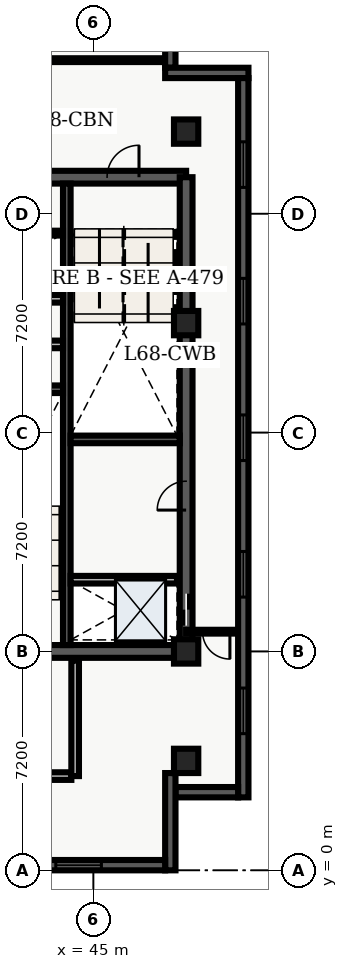
"""IFC4 building model, lengths in metres.
Left out: names, types, materials, properties, quantities, classifications, styles, units other than length and angle.
Written with IfcOpenShell. Run it as: python <this file> out.ifc"""

import sys

from ifc_helpers import new_model, entity, si_unit, converted_unit, direction, frame, origin_with_axes, origin_2d_with_axis, place, context, subcontext, project, spatial, polyline, rectangle, outline, extrude, element, fill, save


model = new_model("IFC4")
c1 = context("Model", 3, precision=1e-05, world=origin_with_axes(), true_north=direction((0.0, 1.0)))
c2 = subcontext(c1, "Body", "Model", "MODEL_VIEW")
j1 = project(units=[si_unit("LENGTHUNIT", "METRE"), converted_unit("PLANEANGLEUNIT", "DEGREE", entity("IfcPlaneAngleMeasure", 0.017), si_unit("PLANEANGLEUNIT", "RADIAN"), dimensions=[0, 0, 0, 0, 0, 0, 0])], contexts=[c1])
p1 = place(None, origin_with_axes())
s1 = spatial("IfcSite", under=j1, at=p1, CompositionType="ELEMENT")
p2 = place(p1, origin_with_axes())
s2 = spatial("IfcBuilding", under=s1, at=p2, CompositionType="ELEMENT")
p3 = place(p2, frame((0.0, 0.0, 276.3), z_axis=(0.0, 0.0, 1.0), x_axis=(1.0, 0.0, 0.0)))
s3 = spatial("IfcBuildingStorey", under=s2, at=p3, CompositionType="ELEMENT", Elevation=276.3)
p4 = place(p3, frame((40.2, 7.2, 0.0), z_axis=(0.0, 0.0, 1.0), x_axis=(1.0, 0.0, 0.0)))
e1 = element("IfcWall", 1, at=p4, inside=s3, PredefinedType="SHEAR", context=c2, shape_type="SweptSolid", body=[
    extrude(outline(polyline([(0.0, -0.21), (7.85, -0.21), (7.85, 0.21), (0.0, 0.21), (0.0, -0.21)])), origin_with_axes(), (0.0, 0.0, 1.0), 3.66),
])
p5 = place(p4, frame((2.175, 0.0, 0.0), z_axis=(0.0, 0.0, 1.0), x_axis=(1.0, 0.0, 0.0)))
e2 = element("IfcOpeningElement", 2, at=p5, cuts=e1, PredefinedType="OPENING", context=c2, shape_type="SweptSolid", body=[
    extrude(rectangle(XDim=1.05, YDim=0.44, at=origin_2d_with_axis()), origin_with_axes(), (0.0, 0.0, 1.0), 2.15),
])
p6 = place(p3, frame((40.2, 22.8, 0.0), z_axis=(0.0, 0.0, 1.0), x_axis=(1.0, 0.0, 0.0)))
e3 = element("IfcWall", 3, at=p6, inside=s3, PredefinedType="SHEAR", context=c2, shape_type="SweptSolid", body=[
    extrude(outline(polyline([(0.0, -0.21), (7.85, -0.21), (7.85, 0.21), (0.0, 0.21), (0.0, -0.21)])), origin_with_axes(), (0.0, 0.0, 1.0), 3.66),
])
p7 = place(p6, frame((5.775, 0.0, 0.0), z_axis=(0.0, 0.0, 1.0), x_axis=(1.0, 0.0, 0.0)))
e4 = element("IfcOpeningElement", 4, at=p7, cuts=e3, PredefinedType="OPENING", context=c2, shape_type="SweptSolid", body=[
    extrude(rectangle(XDim=1.05, YDim=0.44, at=origin_2d_with_axis()), origin_with_axes(), (0.0, 0.0, 1.0), 2.15),
])
p8 = place(p6, frame((2.15, 0.0, 0.0), z_axis=(0.0, 0.0, 1.0), x_axis=(1.0, 0.0, 0.0)))
e5 = element("IfcOpeningElement", 5, at=p8, cuts=e3, PredefinedType="OPENING", context=c2, shape_type="SweptSolid", body=[
    extrude(rectangle(XDim=0.9, YDim=0.44, at=origin_2d_with_axis()), origin_with_axes(), (0.0, 0.0, 1.0), 2.15),
])
p9 = place(p3, frame((48.05, 7.2, 0.0), z_axis=(0.0, 0.0, 1.0), x_axis=(0.0, 1.0, 0.0)))
e6 = element("IfcWall", 6, at=p9, inside=s3, PredefinedType="SHEAR", context=c2, shape_type="SweptSolid", body=[
    extrude(outline(polyline([(0.0, -0.21), (15.6, -0.21), (15.6, 0.21), (0.0, 0.21), (0.0, -0.21)])), origin_with_axes(), (0.0, 0.0, 1.0), 3.66),
])
p10 = place(p9, frame((1.375, 0.0, 0.0), z_axis=(0.0, 0.0, 1.0), x_axis=(1.0, 0.0, 0.0)))
e7 = element("IfcOpeningElement", 7, at=p10, cuts=e6, PredefinedType="OPENING", context=c2, shape_type="SweptSolid", body=[
    extrude(rectangle(XDim=1.05, YDim=0.44, at=origin_2d_with_axis()), origin_with_axes(), (0.0, 0.0, 1.0), 2.15),
])
p11 = place(p9, frame((5.125, 0.0, 0.0), z_axis=(0.0, 0.0, 1.0), x_axis=(1.0, 0.0, 0.0)))
e8 = element("IfcOpeningElement", 8, at=p11, cuts=e6, PredefinedType="OPENING", context=c2, shape_type="SweptSolid", body=[
    extrude(rectangle(XDim=0.95, YDim=0.44, at=origin_2d_with_axis()), origin_with_axes(), (0.0, 0.0, 1.0), 2.15),
])
p12 = place(p3, frame((44.125, 7.41, 0.0), z_axis=(0.0, 0.0, 1.0), x_axis=(0.0, 1.0, 0.0)))
e9 = element("IfcWall", 9, at=p12, inside=s3, PredefinedType="SHEAR", context=c2, shape_type="SweptSolid", body=[
    extrude(outline(polyline([(0.0, -0.125), (15.18, -0.125), (15.18, 0.125), (0.0, 0.125), (0.0, -0.125)])), origin_with_axes(), (0.0, 0.0, 1.0), 3.66),
])
for number, where, z_axis, x_axis in (
    (10, (40.41, 15.825, 0.0), (0.0, 0.0, 1.0), (1.0, 0.0, 0.0)),
    (11, (44.25, 14.175, 0.0), (0.0, 0.0, 1.0), (1.0, 0.0, 0.0)),
):
    element("IfcWall", number, at=place(p3, frame(where, z_axis=z_axis, x_axis=x_axis)), inside=s3, PredefinedType="SHEAR", context=c2, shape_type="SweptSolid", body=[
        extrude(outline(polyline([(0.0, -0.125), (3.59, -0.125), (3.59, 0.125), (0.0, 0.125), (0.0, -0.125)])), origin_with_axes(), (0.0, 0.0, 1.0), 3.66),
    ])
p13 = place(p3, frame((40.5, 17.3, 0.0), z_axis=(0.0, 0.0, 1.0), x_axis=(1.0, 0.0, 0.0)))
e12 = element("IfcWall", 12, at=p13, inside=s3, PredefinedType="SOLIDWALL", context=c2, shape_type="SweptSolid", body=[
    extrude(outline(polyline([(0.0, -0.125), (3.5, -0.125), (3.5, 0.125), (0.0, 0.125), (0.0, -0.125)])), origin_with_axes(), (0.0, 0.0, 1.0), 2.7),
])
p14 = place(p13, frame((2.4, 0.0, 0.0), z_axis=(0.0, 0.0, 1.0), x_axis=(1.0, 0.0, 0.0)))
e13 = element("IfcOpeningElement", 13, at=p14, cuts=e12, PredefinedType="OPENING", context=c2, shape_type="SweptSolid", body=[
    extrude(rectangle(XDim=0.9, YDim=0.27, at=origin_2d_with_axis()), origin_with_axes(), (0.0, 0.0, 1.0), 2.15),
])
p15 = place(p3, frame((40.5, 18.8, 0.0), z_axis=(0.0, 0.0, 1.0), x_axis=(1.0, 0.0, 0.0)))
e14 = element("IfcWall", 14, at=p15, inside=s3, PredefinedType="SOLIDWALL", context=c2, shape_type="SweptSolid", body=[
    extrude(outline(polyline([(0.0, -0.125), (3.5, -0.125), (3.5, 0.125), (0.0, 0.125), (0.0, -0.125)])), origin_with_axes(), (0.0, 0.0, 1.0), 2.7),
])
p16 = place(p3, frame((40.325, 3.1, 0.0), z_axis=(0.0, 0.0, 1.0), x_axis=(1.0, 0.0, 0.0)))
e15 = element("IfcWall", 15, at=p16, inside=s3, PredefinedType="SOLIDWALL", context=c2, shape_type="SweptSolid", body=[
    extrude(outline(polyline([(0.0, -0.125), (3.95, -0.125), (3.95, 0.125), (0.0, 0.125), (0.0, -0.125)])), origin_with_axes(), (0.0, 0.0, 1.0), 2.7),
])
p17 = place(p3, frame((44.4, 3.1, 0.0), z_axis=(0.0, 0.0, 1.0), x_axis=(0.0, 1.0, 0.0)))
e16 = element("IfcWall", 16, at=p17, inside=s3, PredefinedType="SOLIDWALL", context=c2, shape_type="SweptSolid", body=[
    extrude(outline(polyline([(0.0, -0.125), (3.8, -0.125), (3.8, 0.125), (0.0, 0.125), (0.0, -0.125)])), origin_with_axes(), (0.0, 0.0, 1.0), 2.7),
])
for number, where, z_axis, x_axis in (
    (17, (48.05, 3.6, 0.0), (0.0, 0.0, 1.0), (1.0, 0.0, 0.0)),
    (18, (48.05, 7.2, 0.0), (0.0, 0.0, 1.0), (1.0, 0.0, 0.0)),
    (19, (48.05, 18.0, 0.0), (0.0, 0.0, 1.0), (1.0, 0.0, 0.0)),
    (20, (48.05, 24.3, 0.0), (0.0, 0.0, 1.0), (1.0, 0.0, 0.0)),
):
    element("IfcColumn", number, at=place(p3, frame(where, z_axis=z_axis, x_axis=x_axis)), inside=s3, PredefinedType="COLUMN", context=c2, shape_type="SweptSolid", body=[
        extrude(rectangle(XDim=0.8, YDim=0.8, at=origin_2d_with_axis()), origin_with_axes(), (0.0, 0.0, 1.0), 3.9),
    ])
p18 = place(p3, frame((40.5, 20.96, 0.0), z_axis=(0.0, 0.0, 1.0), x_axis=(1.0, 0.0, 0.0)))
e21 = element("IfcWall", 21, at=p18, inside=s3, PredefinedType="PARTITIONING", context=c2, shape_type="SweptSolid", body=[
    extrude(outline(polyline([(0.0, -0.08), (3.5, -0.08), (3.5, 0.08), (0.0, 0.08), (0.0, -0.08)])), origin_with_axes(), (0.0, 0.0, 1.0), 2.7),
])
p19 = place(p3, frame((44.25, 9.56, 0.0), z_axis=(0.0, 0.0, 1.0), x_axis=(1.0, 0.0, 0.0)))
e22 = element("IfcWall", 22, at=p19, inside=s3, PredefinedType="SOLIDWALL", context=c2, shape_type="SweptSolid", body=[
    extrude(outline(polyline([(0.0, -0.125), (3.5, -0.125), (3.5, 0.125), (0.0, 0.125), (0.0, -0.125)])), origin_with_axes(), (0.0, 0.0, 1.0), 2.7),
])
p20 = place(p3, frame((49.765, 7.85, 0.0), z_axis=(0.0, 0.0, 1.0), x_axis=(-1.0, 0.0, 0.0)))
e23 = element("IfcWall", 23, at=p20, inside=s3, PredefinedType="PARTITIONING", context=c2, shape_type="SweptSolid", body=[
    extrude(outline(polyline([(0.0, -0.062), (1.715, -0.062), (1.715, 0.062), (0.0, 0.062), (0.0, -0.062)])), origin_with_axes(), (0.0, 0.0, 1.0), 2.7),
])
p21 = place(p20, frame((0.725, 0.0, 0.0), z_axis=(0.0, 0.0, 1.0), x_axis=(1.0, 0.0, 0.0)))
e24 = element("IfcOpeningElement", 24, at=p21, cuts=e23, PredefinedType="OPENING", context=c2, shape_type="SweptSolid", body=[
    extrude(rectangle(XDim=0.9, YDim=0.145, at=origin_2d_with_axis()), origin_with_axes(), (0.0, 0.0, 1.0), 2.15),
])
p22 = place(p3, frame((34.535, 26.65, 0.0), z_axis=(0.0, 0.0, 1.0), x_axis=(1.0, 0.0, 0.0)))
e25 = element("IfcWall", 25, at=p22, inside=s3, PredefinedType="PARTITIONING", context=c2, shape_type="SweptSolid", body=[
    extrude(outline(polyline([(0.0, -0.062), (12.995, -0.062), (12.995, 0.062), (0.0, 0.062), (0.0, -0.062)])), origin_with_axes(), (0.0, 0.0, 1.0), 2.7),
])
p23 = place(p22, frame((8.465, 0.0, 0.0), z_axis=(0.0, 0.0, 1.0), x_axis=(1.0, 0.0, 0.0)))
e26 = element("IfcOpeningElement", 26, at=p23, cuts=e25, PredefinedType="OPENING", context=c2, shape_type="SweptSolid", body=[
    extrude(rectangle(XDim=1.0, YDim=0.145, at=origin_2d_with_axis()), origin_with_axes(), (0.0, 0.0, 1.0), 2.15),
])
p24 = place(p3, frame((47.53, 28.46, 0.0), z_axis=(0.0, 0.0, 1.0), x_axis=(0.0, -1.0, 0.0)))
e27 = element("IfcWall", 27, at=p24, inside=s3, PredefinedType="SOLIDWALL", context=c2, shape_type="SweptSolid", body=[
    extrude(outline(polyline([(0.0, -0.17), (2.06, -0.17), (2.06, 0.17), (0.0, 0.17), (0.0, -0.17)])), origin_with_axes(), (0.0, 0.0, 1.0), 3.66),
])
p25 = place(p3, frame((47.36, 26.23, 0.0), z_axis=(0.0, 0.0, 1.0), x_axis=(1.0, 0.0, 0.0)))
e28 = element("IfcWall", 28, at=p25, inside=s3, PredefinedType="SOLIDWALL", context=c2, shape_type="SweptSolid", body=[
    extrude(outline(polyline([(0.0, -0.17), (2.74, -0.17), (2.74, 0.17), (0.0, 0.17), (0.0, -0.17)])), origin_with_axes(), (0.0, 0.0, 1.0), 3.66),
])
p26 = place(p3, frame((49.93, 26.06, 0.0), z_axis=(0.0, 0.0, 1.0), x_axis=(0.0, -1.0, 0.0)))
e29 = element("IfcWall", 29, at=p26, inside=s3, PredefinedType="SOLIDWALL", context=c2, shape_type="SweptSolid", body=[
    extrude(outline(polyline([(0.0, -0.17), (23.66, -0.17), (23.66, 0.17), (0.0, 0.17), (0.0, -0.17)])), origin_with_axes(), (0.0, 0.0, 1.0), 3.66),
])
p27 = place(p26, frame((2.846, 0.0, 0.45), z_axis=(0.0, 0.0, 1.0), x_axis=(1.0, 0.0, 0.0)))
e30 = element("IfcOpeningElement", 30, at=p27, cuts=e29, PredefinedType="OPENING", context=c2, shape_type="SweptSolid", body=[
    extrude(rectangle(XDim=1.5, YDim=0.36, at=origin_2d_with_axis()), origin_with_axes(), (0.0, 0.0, 1.0), 2.1),
])
p28 = place(p26, frame((7.338, 0.0, 0.45), z_axis=(0.0, 0.0, 1.0), x_axis=(1.0, 0.0, 0.0)))
e31 = element("IfcOpeningElement", 31, at=p28, cuts=e29, PredefinedType="OPENING", context=c2, shape_type="SweptSolid", body=[
    extrude(rectangle(XDim=1.5, YDim=0.36, at=origin_2d_with_axis()), origin_with_axes(), (0.0, 0.0, 1.0), 2.1),
])
p29 = place(p26, frame((11.83, 0.0, 0.45), z_axis=(0.0, 0.0, 1.0), x_axis=(1.0, 0.0, 0.0)))
e32 = element("IfcOpeningElement", 32, at=p29, cuts=e29, PredefinedType="OPENING", context=c2, shape_type="SweptSolid", body=[
    extrude(rectangle(XDim=1.5, YDim=0.36, at=origin_2d_with_axis()), origin_with_axes(), (0.0, 0.0, 1.0), 2.1),
])
p30 = place(p26, frame((16.322, 0.0, 0.45), z_axis=(0.0, 0.0, 1.0), x_axis=(1.0, 0.0, 0.0)))
e33 = element("IfcOpeningElement", 33, at=p30, cuts=e29, PredefinedType="OPENING", context=c2, shape_type="SweptSolid", body=[
    extrude(rectangle(XDim=1.5, YDim=0.36, at=origin_2d_with_axis()), origin_with_axes(), (0.0, 0.0, 1.0), 2.1),
])
p31 = place(p26, frame((20.814, 0.0, 0.45), z_axis=(0.0, 0.0, 1.0), x_axis=(1.0, 0.0, 0.0)))
e34 = element("IfcOpeningElement", 34, at=p31, cuts=e29, PredefinedType="OPENING", context=c2, shape_type="SweptSolid", body=[
    extrude(rectangle(XDim=1.5, YDim=0.36, at=origin_2d_with_axis()), origin_with_axes(), (0.0, 0.0, 1.0), 2.1),
])
p32 = place(p3, frame((49.76, 2.57, 0.0), z_axis=(0.0, 0.0, 1.0), x_axis=(-1.0, 0.0, 0.0)))
e35 = element("IfcWall", 35, at=p32, inside=s3, PredefinedType="SOLIDWALL", context=c2, shape_type="SweptSolid", body=[
    extrude(outline(polyline([(0.0, -0.17), (2.06, -0.17), (2.06, 0.17), (0.0, 0.17), (0.0, -0.17)])), origin_with_axes(), (0.0, 0.0, 1.0), 3.66),
])
p33 = place(p3, frame((47.53, 3.2, 0.0), z_axis=(0.0, 0.0, 1.0), x_axis=(0.0, -1.0, 0.0)))
e36 = element("IfcWall", 36, at=p33, inside=s3, PredefinedType="SOLIDWALL", context=c2, shape_type="SweptSolid", body=[
    extrude(outline(polyline([(0.0, -0.17), (3.2, -0.17), (3.2, 0.17), (0.0, 0.17), (0.0, -0.17)])), origin_with_axes(), (0.0, 0.0, 1.0), 3.66),
])
p34 = place(p3, frame((47.36, 0.17, 0.0), z_axis=(0.0, 0.0, 1.0), x_axis=(-1.0, 0.0, 0.0)))
e37 = element("IfcWall", 37, at=p34, inside=s3, PredefinedType="SOLIDWALL", context=c2, shape_type="SweptSolid", body=[
    extrude(outline(polyline([(0.0, -0.17), (37.16, -0.17), (37.16, 0.17), (0.0, 0.17), (0.0, -0.17)])), origin_with_axes(), (0.0, 0.0, 1.0), 3.66),
])
p35 = place(p34, frame((2.847, 0.0, 0.45), z_axis=(0.0, 0.0, 1.0), x_axis=(1.0, 0.0, 0.0)))
e38 = element("IfcOpeningElement", 38, at=p35, cuts=e37, PredefinedType="OPENING", context=c2, shape_type="SweptSolid", body=[
    extrude(rectangle(XDim=1.5, YDim=0.36, at=origin_2d_with_axis()), origin_with_axes(), (0.0, 0.0, 1.0), 2.1),
])
p36 = place(p34, frame((7.342, 0.0, 0.45), z_axis=(0.0, 0.0, 1.0), x_axis=(1.0, 0.0, 0.0)))
e39 = element("IfcOpeningElement", 39, at=p36, cuts=e37, PredefinedType="OPENING", context=c2, shape_type="SweptSolid", body=[
    extrude(rectangle(XDim=1.5, YDim=0.36, at=origin_2d_with_axis()), origin_with_axes(), (0.0, 0.0, 1.0), 2.1),
])
p37 = place(p34, frame((11.837, 0.0, 0.45), z_axis=(0.0, 0.0, 1.0), x_axis=(1.0, 0.0, 0.0)))
e40 = element("IfcOpeningElement", 40, at=p37, cuts=e37, PredefinedType="OPENING", context=c2, shape_type="SweptSolid", body=[
    extrude(rectangle(XDim=1.5, YDim=0.36, at=origin_2d_with_axis()), origin_with_axes(), (0.0, 0.0, 1.0), 2.1),
])
p38 = place(p34, frame((15.882, 0.0, 0.45), z_axis=(0.0, 0.0, 1.0), x_axis=(1.0, 0.0, 0.0)))
e41 = element("IfcOpeningElement", 41, at=p38, cuts=e37, PredefinedType="OPENING", context=c2, shape_type="SweptSolid", body=[
    extrude(rectangle(XDim=1.5, YDim=0.36, at=origin_2d_with_axis()), origin_with_axes(), (0.0, 0.0, 1.0), 2.1),
])
p39 = place(p34, frame((20.827, 0.0, 0.45), z_axis=(0.0, 0.0, 1.0), x_axis=(1.0, 0.0, 0.0)))
e42 = element("IfcOpeningElement", 42, at=p39, cuts=e37, PredefinedType="OPENING", context=c2, shape_type="SweptSolid", body=[
    extrude(rectangle(XDim=1.5, YDim=0.36, at=origin_2d_with_axis()), origin_with_axes(), (0.0, 0.0, 1.0), 2.1),
])
p40 = place(p34, frame((25.322, 0.0, 0.45), z_axis=(0.0, 0.0, 1.0), x_axis=(1.0, 0.0, 0.0)))
e43 = element("IfcOpeningElement", 43, at=p40, cuts=e37, PredefinedType="OPENING", context=c2, shape_type="SweptSolid", body=[
    extrude(rectangle(XDim=1.5, YDim=0.36, at=origin_2d_with_axis()), origin_with_axes(), (0.0, 0.0, 1.0), 2.1),
])
p41 = place(p34, frame((29.817, 0.0, 0.45), z_axis=(0.0, 0.0, 1.0), x_axis=(1.0, 0.0, 0.0)))
e44 = element("IfcOpeningElement", 44, at=p41, cuts=e37, PredefinedType="OPENING", context=c2, shape_type="SweptSolid", body=[
    extrude(rectangle(XDim=1.5, YDim=0.36, at=origin_2d_with_axis()), origin_with_axes(), (0.0, 0.0, 1.0), 2.1),
])
p42 = place(p34, frame((34.312, 0.0, 0.45), z_axis=(0.0, 0.0, 1.0), x_axis=(1.0, 0.0, 0.0)))
e45 = element("IfcOpeningElement", 45, at=p42, cuts=e37, PredefinedType="OPENING", context=c2, shape_type="SweptSolid", body=[
    extrude(rectangle(XDim=1.5, YDim=0.36, at=origin_2d_with_axis()), origin_with_axes(), (0.0, 0.0, 1.0), 2.1),
])
p43 = place(p9, frame((1.375, 0.0, 0.0), z_axis=(0.0, 0.0, 1.0), x_axis=(1.0, 0.0, 0.0)))
e46 = element("IfcDoor", 46, at=p43, inside=s3, OperationType="SLIDING_TO_LEFT", PredefinedType="DOOR", context=c2, shape_type="SweptSolid", body=[
    extrude(rectangle(XDim=1.05, YDim=0.09, at=origin_2d_with_axis()), origin_with_axes(), (0.0, 0.0, 1.0), 2.15),
])
fill(e7, e46)
p44 = place(p6, frame((5.775, 0.0, 0.0), z_axis=(0.0, 0.0, 1.0), x_axis=(1.0, 0.0, 0.0)))
e47 = element("IfcDoor", 47, at=p44, inside=s3, OperationType="SINGLE_SWING_RIGHT", PredefinedType="DOOR", context=c2, shape_type="SweptSolid", body=[
    extrude(rectangle(XDim=1.05, YDim=0.09, at=origin_2d_with_axis()), origin_with_axes(), (0.0, 0.0, 1.0), 2.15),
])
fill(e4, e47)
p45 = place(p9, frame((5.125, 0.0, 0.0), z_axis=(0.0, 0.0, 1.0), x_axis=(1.0, 0.0, 0.0)))
e48 = element("IfcDoor", 48, at=p45, inside=s3, OperationType="SINGLE_SWING_LEFT", PredefinedType="DOOR", context=c2, shape_type="SweptSolid", body=[
    extrude(rectangle(XDim=0.95, YDim=0.09, at=origin_2d_with_axis()), origin_with_axes(), (0.0, 0.0, 1.0), 2.15),
])
fill(e8, e48)
p46 = place(p20, frame((0.725, 0.0, 0.0), z_axis=(0.0, 0.0, 1.0), x_axis=(1.0, 0.0, 0.0)))
e49 = element("IfcDoor", 49, at=p46, inside=s3, OperationType="SINGLE_SWING_LEFT", PredefinedType="DOOR", context=c2, shape_type="SweptSolid", body=[
    extrude(rectangle(XDim=0.9, YDim=0.075, at=origin_2d_with_axis()), origin_with_axes(), (0.0, 0.0, 1.0), 2.15),
])
fill(e24, e49)
p47 = place(p26, frame((2.846, 0.0, 0.45), z_axis=(0.0, 0.0, 1.0), x_axis=(1.0, 0.0, 0.0)))
e50 = element("IfcWindow", 50, at=p47, inside=s3, PredefinedType="WINDOW", context=c2, shape_type="SweptSolid", body=[
    extrude(rectangle(XDim=1.5, YDim=0.09, at=origin_2d_with_axis()), origin_with_axes(), (0.0, 0.0, 1.0), 2.1),
])
fill(e30, e50)
p48 = place(p26, frame((7.338, 0.0, 0.45), z_axis=(0.0, 0.0, 1.0), x_axis=(1.0, 0.0, 0.0)))
e51 = element("IfcWindow", 51, at=p48, inside=s3, PredefinedType="WINDOW", context=c2, shape_type="SweptSolid", body=[
    extrude(rectangle(XDim=1.5, YDim=0.09, at=origin_2d_with_axis()), origin_with_axes(), (0.0, 0.0, 1.0), 2.1),
])
fill(e31, e51)
p49 = place(p26, frame((11.83, 0.0, 0.45), z_axis=(0.0, 0.0, 1.0), x_axis=(1.0, 0.0, 0.0)))
e52 = element("IfcWindow", 52, at=p49, inside=s3, PredefinedType="WINDOW", context=c2, shape_type="SweptSolid", body=[
    extrude(rectangle(XDim=1.5, YDim=0.09, at=origin_2d_with_axis()), origin_with_axes(), (0.0, 0.0, 1.0), 2.1),
])
fill(e32, e52)
p50 = place(p26, frame((16.322, 0.0, 0.45), z_axis=(0.0, 0.0, 1.0), x_axis=(1.0, 0.0, 0.0)))
e53 = element("IfcWindow", 53, at=p50, inside=s3, PredefinedType="WINDOW", context=c2, shape_type="SweptSolid", body=[
    extrude(rectangle(XDim=1.5, YDim=0.09, at=origin_2d_with_axis()), origin_with_axes(), (0.0, 0.0, 1.0), 2.1),
])
fill(e33, e53)
p51 = place(p26, frame((20.814, 0.0, 0.45), z_axis=(0.0, 0.0, 1.0), x_axis=(1.0, 0.0, 0.0)))
e54 = element("IfcWindow", 54, at=p51, inside=s3, PredefinedType="WINDOW", context=c2, shape_type="SweptSolid", body=[
    extrude(rectangle(XDim=1.5, YDim=0.09, at=origin_2d_with_axis()), origin_with_axes(), (0.0, 0.0, 1.0), 2.1),
])
fill(e34, e54)
p52 = place(p34, frame((2.847, 0.0, 0.45), z_axis=(0.0, 0.0, 1.0), x_axis=(1.0, 0.0, 0.0)))
e55 = element("IfcWindow", 55, at=p52, inside=s3, PredefinedType="WINDOW", context=c2, shape_type="SweptSolid", body=[
    extrude(rectangle(XDim=1.5, YDim=0.09, at=origin_2d_with_axis()), origin_with_axes(), (0.0, 0.0, 1.0), 2.1),
])
fill(e38, e55)
save(model, sys.argv[1])
